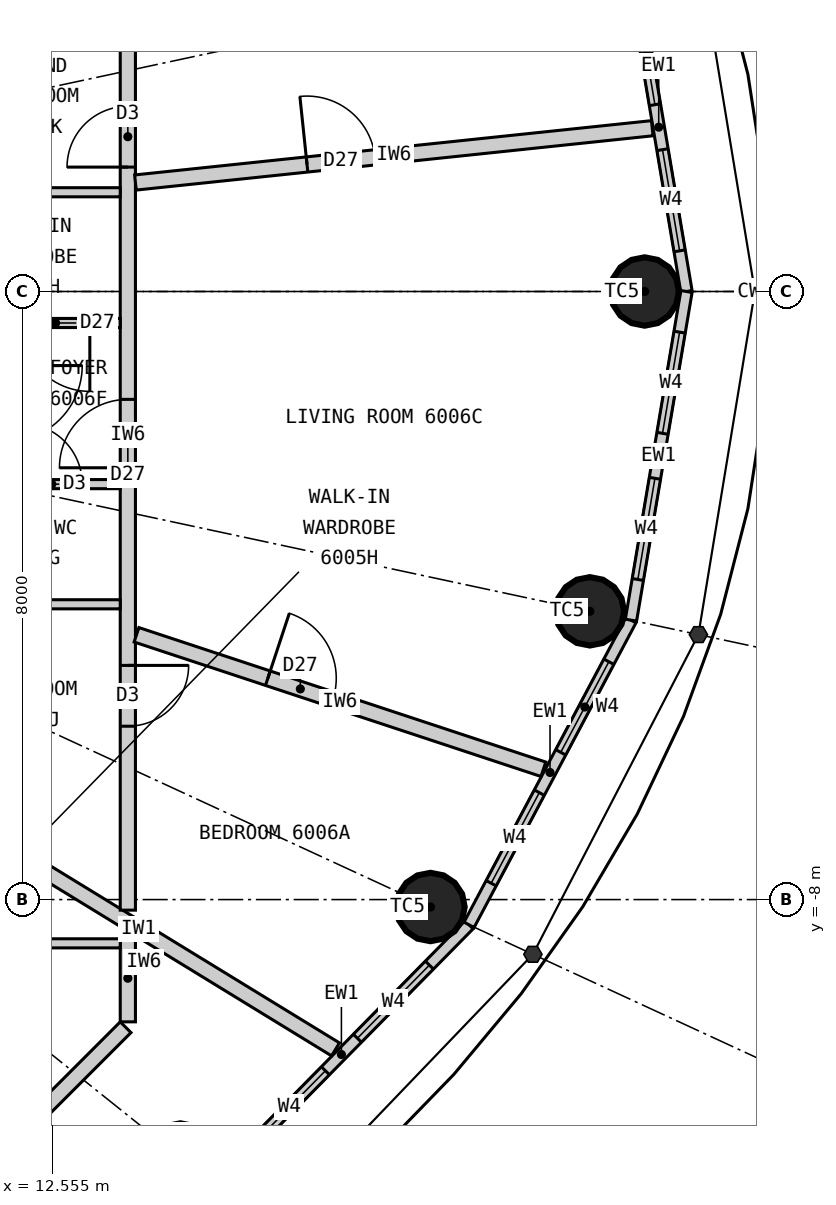
"""IFC4 building model, lengths in metres.
Left out: names, types, materials, properties, quantities, classifications, styles, units other than length and angle.
Written with IfcOpenShell. Run it as: python <this file> out.ifc"""

import sys

from ifc_helpers import new_model, si_unit, direction, frame, frame_2d, origin, origin_2d, place, context, subcontext, project, spatial, rectangle, circle, extrude, element, fill, save


model = new_model("IFC4")
c1 = context("Model", 3, precision=1e-05, world=origin(), true_north=direction((0.0, 1.0)))
c2 = subcontext(c1, "Body", "Model", "MODEL_VIEW")
j1 = project(units=[si_unit("LENGTHUNIT", "METRE"), si_unit("PLANEANGLEUNIT", "RADIAN")], contexts=[c1])
p1 = place(None, origin())
s1 = spatial("IfcSite", under=j1, at=p1, CompositionType="ELEMENT")
p2 = place(p1, origin())
s2 = spatial("IfcBuilding", under=s1, at=p2, CompositionType="ELEMENT")
p3 = place(p2, frame((0.0, 0.0, 222.6)))
s3 = spatial("IfcBuildingStorey", under=s2, at=p3, CompositionType="ELEMENT", Elevation=222.6)
for number, where, z_axis, x_axis in (
    (1, (20.35, 0.0, 0.0), (0.0, 0.0, 1.0), (1.0, 0.0, 0.0)),
    (2, (14.241, -11.393, 0.0), (0.0, 0.0, 1.0), (1.0, 0.0, 0.0)),
    (3, (17.532, -8.098, 0.0), (0.0, 0.0, 1.0), (1.0, 0.0, 0.0)),
    (4, (19.629, -4.208, 0.0), (0.0, 0.0, 1.0), (1.0, 0.0, 0.0)),
):
    element("IfcColumn", number, at=place(p3, frame(where, z_axis=z_axis, x_axis=x_axis)), inside=s3, PredefinedType="COLUMN", context=c2, shape_type="SweptSolid", body=[
        extrude(circle(Radius=0.45, at=origin_2d()), origin(), (0.0, 0.0, 1.0), 3.3),
    ])
p4 = place(p3, frame((20.9, 0.0, 0.0), z_axis=(0.0, 0.0, 1.0), x_axis=(-0.166538513568, 0.986034950445, 0.0)))
e5 = element("IfcWall", 5, at=p4, inside=s3, PredefinedType="ELEMENTEDWALL", context=c2, shape_type="SweptSolid", body=[
    extrude(rectangle(XDim=4.385, YDim=0.15, at=frame_2d((2.192, 0.0))), origin(), (0.0, 0.0, 1.0), 3.12),
])
p5 = place(p4, frame((0.542, 0.0, 0.9)))
e6 = element("IfcOpeningElement", 6, at=p5, cuts=e5, PredefinedType="OPENING", context=c2, shape_type="SweptSolid", body=[
    extrude(rectangle(XDim=1.35, YDim=1.9, at=frame_2d((0.675, 0.95))), frame((0.0, 0.085, 0.0), z_axis=(0.0, -1.0, 0.0), x_axis=(1.0, 0.0, 0.0)), (0.0, 0.0, 1.0), 0.17),
])
p6 = place(p4, frame((2.492, 0.0, 0.9)))
e7 = element("IfcOpeningElement", 7, at=p6, cuts=e5, PredefinedType="OPENING", context=c2, shape_type="SweptSolid", body=[
    extrude(rectangle(XDim=1.35, YDim=1.9, at=frame_2d((0.675, 0.95))), frame((0.0, 0.085, 0.0), z_axis=(0.0, -1.0, 0.0), x_axis=(1.0, 0.0, 0.0)), (0.0, 0.0, 1.0), 0.17),
])
p7 = place(p3, frame((14.68, -11.744, 0.0), z_axis=(0.0, 0.0, 1.0), x_axis=(0.701527379618, 0.712642501993, 0.0)))
e8 = element("IfcWall", 8, at=p7, inside=s3, PredefinedType="ELEMENTEDWALL", context=c2, shape_type="SweptSolid", body=[
    extrude(rectangle(XDim=4.788, YDim=0.15, at=frame_2d((2.394, 0.0))), origin(), (0.0, 0.0, 1.0), 3.12),
])
p8 = place(p7, frame((0.744, 0.0, 0.9)))
e9 = element("IfcOpeningElement", 9, at=p8, cuts=e8, PredefinedType="OPENING", context=c2, shape_type="SweptSolid", body=[
    extrude(rectangle(XDim=1.35, YDim=1.9, at=frame_2d((0.675, 0.95))), frame((0.0, 0.085, 0.0), z_axis=(0.0, -1.0, 0.0), x_axis=(1.0, 0.0, 0.0)), (0.0, 0.0, 1.0), 0.17),
])
p9 = place(p7, frame((2.694, 0.0, 0.9)))
e10 = element("IfcOpeningElement", 10, at=p9, cuts=e8, PredefinedType="OPENING", context=c2, shape_type="SweptSolid", body=[
    extrude(rectangle(XDim=1.35, YDim=1.9, at=frame_2d((0.675, 0.95))), frame((0.0, 0.085, 0.0), z_axis=(0.0, -1.0, 0.0), x_axis=(1.0, 0.0, 0.0)), (0.0, 0.0, 1.0), 0.17),
])
p10 = place(p3, frame((18.04, -8.332, 0.0), z_axis=(0.0, 0.0, 1.0), x_axis=(0.469256152955, 0.883062094597, 0.0)))
e11 = element("IfcWall", 11, at=p10, inside=s3, PredefinedType="ELEMENTEDWALL", context=c2, shape_type="SweptSolid", body=[
    extrude(rectangle(XDim=4.539, YDim=0.15, at=frame_2d((2.27, 0.0))), origin(), (0.0, 0.0, 1.0), 3.12),
])
p11 = place(p10, frame((0.62, 0.0, 0.9)))
e12 = element("IfcOpeningElement", 12, at=p11, cuts=e11, PredefinedType="OPENING", context=c2, shape_type="SweptSolid", body=[
    extrude(rectangle(XDim=1.35, YDim=1.9, at=frame_2d((0.675, 0.95))), frame((0.0, 0.085, 0.0), z_axis=(0.0, -1.0, 0.0), x_axis=(1.0, 0.0, 0.0)), (0.0, 0.0, 1.0), 0.17),
])
p12 = place(p10, frame((2.57, 0.0, 0.9)))
e13 = element("IfcOpeningElement", 13, at=p12, cuts=e11, PredefinedType="OPENING", context=c2, shape_type="SweptSolid", body=[
    extrude(rectangle(XDim=1.35, YDim=1.9, at=frame_2d((0.675, 0.95))), frame((0.0, 0.085, 0.0), z_axis=(0.0, -1.0, 0.0), x_axis=(1.0, 0.0, 0.0)), (0.0, 0.0, 1.0), 0.17),
])
p13 = place(p3, frame((20.17, -4.323, 0.0), z_axis=(0.0, 0.0, 1.0), x_axis=(0.166538513568, 0.986034950445, 0.0)))
e14 = element("IfcWall", 14, at=p13, inside=s3, PredefinedType="ELEMENTEDWALL", context=c2, shape_type="SweptSolid", body=[
    extrude(rectangle(XDim=4.385, YDim=0.15, at=frame_2d((2.192, 0.0))), origin(), (0.0, 0.0, 1.0), 3.12),
])
p14 = place(p13, frame((0.542, 0.0, 0.9)))
e15 = element("IfcOpeningElement", 15, at=p14, cuts=e14, PredefinedType="OPENING", context=c2, shape_type="SweptSolid", body=[
    extrude(rectangle(XDim=1.35, YDim=1.9, at=frame_2d((0.675, 0.95))), frame((0.0, 0.085, 0.0), z_axis=(0.0, -1.0, 0.0), x_axis=(1.0, 0.0, 0.0)), (0.0, 0.0, 1.0), 0.17),
])
p15 = place(p13, frame((2.492, 0.0, 0.9)))
e16 = element("IfcOpeningElement", 16, at=p15, cuts=e14, PredefinedType="OPENING", context=c2, shape_type="SweptSolid", body=[
    extrude(rectangle(XDim=1.35, YDim=1.9, at=frame_2d((0.675, 0.95))), frame((0.0, 0.085, 0.0), z_axis=(0.0, -1.0, 0.0), x_axis=(1.0, 0.0, 0.0)), (0.0, 0.0, 1.0), 0.17),
])
p16 = place(p3, frame((11.1, -6.797, 0.0), z_axis=(0.0, 0.0, 1.0), x_axis=(0.852799818179, -0.522237943963, 0.0)))
e17 = element("IfcWall", 17, at=p16, inside=s3, PredefinedType="PARTITIONING", context=c2, shape_type="SweptSolid", body=[
    extrude(rectangle(XDim=6.077, YDim=0.2, at=frame_2d((3.039, 0.0))), origin(), (0.0, 0.0, 1.0), 3.12),
])
p17 = place(p3, frame((10.679, -12.521, 0.0), z_axis=(0.0, 0.0, 1.0), x_axis=(0.707106781187, 0.707106781187, 0.0)))
e18 = element("IfcWall", 18, at=p17, inside=s3, PredefinedType="PARTITIONING", context=c2, shape_type="SweptSolid", body=[
    extrude(rectangle(XDim=4.019, YDim=0.2, at=frame_2d((2.009, 0.0))), origin(), (0.0, 0.0, 1.0), 3.12),
])
p18 = place(p3, frame((13.55, -9.609, 0.0), z_axis=(0.0, 0.0, 1.0), x_axis=(0.0, 1.0, 0.0)))
e19 = element("IfcWall", 19, at=p18, inside=s3, PredefinedType="PARTITIONING", context=c2, shape_type="SweptSolid", body=[
    extrude(rectangle(XDim=1.148, YDim=0.2, at=frame_2d((0.574, 0.0))), origin(), (0.0, 0.0, 1.0), 3.12),
])
p19 = place(p3, frame((11.1, -8.576, 0.0), z_axis=(0.0, 0.0, 1.0), x_axis=(1.0, 0.0, 0.0)))
e20 = element("IfcWall", 20, at=p19, inside=s3, PredefinedType="PARTITIONING", context=c2, shape_type="SweptSolid", body=[
    extrude(rectangle(XDim=2.35, YDim=0.12, at=frame_2d((1.175, 0.0))), origin(), (0.0, 0.0, 1.0), 3.12),
])
p20 = place(p19, frame((0.22, 0.0, 0.0)))
e21 = element("IfcOpeningElement", 21, at=p20, cuts=e20, PredefinedType="OPENING", context=c2, shape_type="SweptSolid", body=[
    extrude(rectangle(XDim=0.9, YDim=2.1, at=frame_2d((0.45, 1.05))), frame((0.0, 0.07, 0.0), z_axis=(0.0, -1.0, 0.0), x_axis=(1.0, 0.0, 0.0)), (0.0, 0.0, 1.0), 0.14),
])
p21 = place(p3, frame((13.55, -8.139, 0.0), z_axis=(0.0, 0.0, 1.0), x_axis=(0.0, 1.0, 0.0)))
e22 = element("IfcWall", 22, at=p21, inside=s3, PredefinedType="PARTITIONING", context=c2, shape_type="SweptSolid", body=[
    extrude(rectangle(XDim=12.496, YDim=0.2, at=frame_2d((6.248, 0.0))), origin(), (0.0, 0.0, 1.0), 3.12),
])
p22 = place(p21, frame((2.42, 0.0, 0.0)))
e23 = element("IfcOpeningElement", 23, at=p22, cuts=e22, PredefinedType="OPENING", context=c2, shape_type="SweptSolid", body=[
    extrude(rectangle(XDim=0.8, YDim=2.1, at=frame_2d((0.4, 1.05))), frame((0.0, 0.11, 0.0), z_axis=(0.0, -1.0, 0.0), x_axis=(1.0, 0.0, 0.0)), (0.0, 0.0, 1.0), 0.22),
])
p23 = place(p21, frame((9.776, 0.0, 0.0)))
e24 = element("IfcOpeningElement", 24, at=p23, cuts=e22, PredefinedType="OPENING", context=c2, shape_type="SweptSolid", body=[
    extrude(rectangle(XDim=0.8, YDim=2.1, at=frame_2d((0.4, 1.05))), frame((0.0, 0.11, 0.0), z_axis=(0.0, -1.0, 0.0), x_axis=(1.0, 0.0, 0.0)), (0.0, 0.0, 1.0), 0.22),
])
p24 = place(p21, frame((5.82, 0.0, 0.0)))
e25 = element("IfcOpeningElement", 25, at=p24, cuts=e22, PredefinedType="OPENING", context=c2, shape_type="SweptSolid", body=[
    extrude(rectangle(XDim=0.9, YDim=2.1, at=frame_2d((0.45, 1.05))), frame((0.0, 0.11, 0.0), z_axis=(0.0, -1.0, 0.0), x_axis=(1.0, 0.0, 0.0)), (0.0, 0.0, 1.0), 0.22),
])
p25 = place(p3, frame((13.664, -4.516, 0.0), z_axis=(0.0, 0.0, 1.0), x_axis=(0.949481375941, -0.313823384632, 0.0)))
e26 = element("IfcWall", 26, at=p25, inside=s3, PredefinedType="PARTITIONING", context=c2, shape_type="SweptSolid", body=[
    extrude(rectangle(XDim=5.638, YDim=0.2, at=frame_2d((2.819, 0.0))), origin(), (0.0, 0.0, 1.0), 3.12),
])
p26 = place(p25, frame((1.82, 0.0, 0.0)))
e27 = element("IfcOpeningElement", 27, at=p26, cuts=e26, PredefinedType="OPENING", context=c2, shape_type="SweptSolid", body=[
    extrude(rectangle(XDim=0.9, YDim=2.1, at=frame_2d((0.45, 1.05))), frame((0.0, 0.11, 0.0), z_axis=(0.0, -1.0, 0.0), x_axis=(1.0, 0.0, 0.0)), (0.0, 0.0, 1.0), 0.22),
])
p27 = place(p3, frame((13.65, 1.434, 0.0), z_axis=(0.0, 0.0, 1.0), x_axis=(0.994526954268, 0.10448031984, 0.0)))
e28 = element("IfcWall", 28, at=p27, inside=s3, PredefinedType="PARTITIONING", context=c2, shape_type="SweptSolid", body=[
    extrude(rectangle(XDim=6.837, YDim=0.2, at=frame_2d((3.418, 0.0))), origin(), (0.0, 0.0, 1.0), 2.47),
])
p28 = place(p27, frame((2.27, 0.0, 0.0)))
e29 = element("IfcOpeningElement", 29, at=p28, cuts=e28, PredefinedType="OPENING", context=c2, shape_type="SweptSolid", body=[
    extrude(rectangle(XDim=0.9, YDim=2.1, at=frame_2d((0.45, 1.05))), frame((0.0, 0.11, 0.0), z_axis=(0.0, -1.0, 0.0), x_axis=(1.0, 0.0, 0.0)), (0.0, 0.0, 1.0), 0.22),
])
p29 = place(p3, frame((11.1, -4.115, 0.0), z_axis=(0.0, 0.0, 1.0), x_axis=(1.0, 0.0, 0.0)))
e30 = element("IfcWall", 30, at=p29, inside=s3, PredefinedType="PARTITIONING", context=c2, shape_type="SweptSolid", body=[
    extrude(rectangle(XDim=2.35, YDim=0.12, at=frame_2d((1.175, 0.0))), origin(), (0.0, 0.0, 1.0), 3.12),
])
p30 = place(p3, frame((11.1, -2.534, 0.0), z_axis=(0.0, 0.0, 1.0), x_axis=(1.0, 0.0, 0.0)))
e31 = element("IfcWall", 31, at=p30, inside=s3, PredefinedType="PARTITIONING", context=c2, shape_type="SweptSolid", body=[
    extrude(rectangle(XDim=2.35, YDim=0.12, at=frame_2d((1.175, 0.0))), origin(), (0.0, 0.0, 1.0), 3.12),
])
p31 = place(p30, frame((1.05, 0.0, 0.0)))
e32 = element("IfcOpeningElement", 32, at=p31, cuts=e31, PredefinedType="OPENING", context=c2, shape_type="SweptSolid", body=[
    extrude(rectangle(XDim=0.8, YDim=2.1, at=frame_2d((0.4, 1.05))), frame((0.0, 0.07, 0.0), z_axis=(0.0, -1.0, 0.0), x_axis=(1.0, 0.0, 0.0)), (0.0, 0.0, 1.0), 0.14),
])
p32 = place(p3, frame((11.1, -0.414, 0.0), z_axis=(0.0, 0.0, 1.0), x_axis=(1.0, 0.0, 0.0)))
e33 = element("IfcWall", 33, at=p32, inside=s3, PredefinedType="PARTITIONING", context=c2, shape_type="SweptSolid", body=[
    extrude(rectangle(XDim=2.35, YDim=0.12, at=frame_2d((1.175, 0.0))), origin(), (0.0, 0.0, 1.0), 3.12),
])
p33 = place(p32, frame((1.05, 0.0, 0.0)))
e34 = element("IfcOpeningElement", 34, at=p33, cuts=e33, PredefinedType="OPENING", context=c2, shape_type="SweptSolid", body=[
    extrude(rectangle(XDim=0.9, YDim=2.1, at=frame_2d((0.45, 1.05))), frame((0.0, 0.07, 0.0), z_axis=(0.0, -1.0, 0.0), x_axis=(1.0, 0.0, 0.0)), (0.0, 0.0, 1.0), 0.14),
])
p34 = place(p3, frame((11.1, 1.306, 0.0), z_axis=(0.0, 0.0, 1.0), x_axis=(1.0, 0.0, 0.0)))
e35 = element("IfcWall", 35, at=p34, inside=s3, PredefinedType="PARTITIONING", context=c2, shape_type="SweptSolid", body=[
    extrude(rectangle(XDim=2.35, YDim=0.12, at=frame_2d((1.175, 0.0))), origin(), (0.0, 0.0, 1.0), 3.12),
])
p35 = place(p5, origin())
e36 = element("IfcWindow", 36, at=p35, inside=s3, PartitioningType="SINGLE_PANEL", PredefinedType="WINDOW", context=c2, shape_type="SweptSolid", body=[
    extrude(rectangle(XDim=1.35, YDim=1.9, at=frame_2d((0.675, 0.95))), frame((0.0, 0.03, 0.0), z_axis=(0.0, -1.0, 0.0), x_axis=(1.0, 0.0, 0.0)), (0.0, 0.0, 1.0), 0.06),
])
fill(e6, e36)
p36 = place(p6, origin())
e37 = element("IfcWindow", 37, at=p36, inside=s3, PartitioningType="SINGLE_PANEL", PredefinedType="WINDOW", context=c2, shape_type="SweptSolid", body=[
    extrude(rectangle(XDim=1.35, YDim=1.9, at=frame_2d((0.675, 0.95))), frame((0.0, 0.03, 0.0), z_axis=(0.0, -1.0, 0.0), x_axis=(1.0, 0.0, 0.0)), (0.0, 0.0, 1.0), 0.06),
])
fill(e7, e37)
p37 = place(p8, origin())
e38 = element("IfcWindow", 38, at=p37, inside=s3, PartitioningType="SINGLE_PANEL", PredefinedType="WINDOW", context=c2, shape_type="SweptSolid", body=[
    extrude(rectangle(XDim=1.35, YDim=1.9, at=frame_2d((0.675, 0.95))), frame((0.0, 0.03, 0.0), z_axis=(0.0, -1.0, 0.0), x_axis=(1.0, 0.0, 0.0)), (0.0, 0.0, 1.0), 0.06),
])
fill(e9, e38)
p38 = place(p9, origin())
e39 = element("IfcWindow", 39, at=p38, inside=s3, PartitioningType="SINGLE_PANEL", PredefinedType="WINDOW", context=c2, shape_type="SweptSolid", body=[
    extrude(rectangle(XDim=1.35, YDim=1.9, at=frame_2d((0.675, 0.95))), frame((0.0, 0.03, 0.0), z_axis=(0.0, -1.0, 0.0), x_axis=(1.0, 0.0, 0.0)), (0.0, 0.0, 1.0), 0.06),
])
fill(e10, e39)
p39 = place(p11, origin())
e40 = element("IfcWindow", 40, at=p39, inside=s3, PartitioningType="SINGLE_PANEL", PredefinedType="WINDOW", context=c2, shape_type="SweptSolid", body=[
    extrude(rectangle(XDim=1.35, YDim=1.9, at=frame_2d((0.675, 0.95))), frame((0.0, 0.03, 0.0), z_axis=(0.0, -1.0, 0.0), x_axis=(1.0, 0.0, 0.0)), (0.0, 0.0, 1.0), 0.06),
])
fill(e12, e40)
p40 = place(p12, origin())
e41 = element("IfcWindow", 41, at=p40, inside=s3, PartitioningType="SINGLE_PANEL", PredefinedType="WINDOW", context=c2, shape_type="SweptSolid", body=[
    extrude(rectangle(XDim=1.35, YDim=1.9, at=frame_2d((0.675, 0.95))), frame((0.0, 0.03, 0.0), z_axis=(0.0, -1.0, 0.0), x_axis=(1.0, 0.0, 0.0)), (0.0, 0.0, 1.0), 0.06),
])
fill(e13, e41)
p41 = place(p14, origin())
e42 = element("IfcWindow", 42, at=p41, inside=s3, PartitioningType="SINGLE_PANEL", PredefinedType="WINDOW", context=c2, shape_type="SweptSolid", body=[
    extrude(rectangle(XDim=1.35, YDim=1.9, at=frame_2d((0.675, 0.95))), frame((0.0, 0.03, 0.0), z_axis=(0.0, -1.0, 0.0), x_axis=(1.0, 0.0, 0.0)), (0.0, 0.0, 1.0), 0.06),
])
fill(e15, e42)
p42 = place(p15, origin())
e43 = element("IfcWindow", 43, at=p42, inside=s3, PartitioningType="SINGLE_PANEL", PredefinedType="WINDOW", context=c2, shape_type="SweptSolid", body=[
    extrude(rectangle(XDim=1.35, YDim=1.9, at=frame_2d((0.675, 0.95))), frame((0.0, 0.03, 0.0), z_axis=(0.0, -1.0, 0.0), x_axis=(1.0, 0.0, 0.0)), (0.0, 0.0, 1.0), 0.06),
])
fill(e16, e43)
p43 = place(p22, origin())
e44 = element("IfcDoor", 44, at=p43, inside=s3, OperationType="SINGLE_SWING_RIGHT", PredefinedType="DOOR", context=c2, shape_type="SweptSolid", body=[
    extrude(rectangle(XDim=0.8, YDim=2.1, at=frame_2d((0.4, 1.05))), frame((0.0, 0.025, 0.0), z_axis=(0.0, -1.0, 0.0), x_axis=(1.0, 0.0, 0.0)), (0.0, 0.0, 1.0), 0.05),
])
fill(e23, e44)
p44 = place(p31, origin())
e45 = element("IfcDoor", 45, at=p44, inside=s3, OperationType="SINGLE_SWING_LEFT", PredefinedType="DOOR", context=c2, shape_type="SweptSolid", body=[
    extrude(rectangle(XDim=0.8, YDim=2.1, at=frame_2d((0.4, 1.05))), frame((0.0, 0.025, 0.0), z_axis=(0.0, -1.0, 0.0), x_axis=(1.0, 0.0, 0.0)), (0.0, 0.0, 1.0), 0.05),
])
fill(e32, e45)
p45 = place(p33, origin())
e46 = element("IfcDoor", 46, at=p45, inside=s3, OperationType="SINGLE_SWING_RIGHT", PredefinedType="DOOR", context=c2, shape_type="SweptSolid", body=[
    extrude(rectangle(XDim=0.9, YDim=2.1, at=frame_2d((0.45, 1.05))), frame((0.0, 0.025, 0.0), z_axis=(0.0, -1.0, 0.0), x_axis=(1.0, 0.0, 0.0)), (0.0, 0.0, 1.0), 0.05),
])
fill(e34, e46)
p46 = place(p23, origin())
e47 = element("IfcDoor", 47, at=p46, inside=s3, OperationType="SINGLE_SWING_LEFT", PredefinedType="DOOR", context=c2, shape_type="SweptSolid", body=[
    extrude(rectangle(XDim=0.8, YDim=2.1, at=frame_2d((0.4, 1.05))), frame((0.0, 0.025, 0.0), z_axis=(0.0, -1.0, 0.0), x_axis=(1.0, 0.0, 0.0)), (0.0, 0.0, 1.0), 0.05),
])
fill(e24, e47)
p47 = place(p24, origin())
e48 = element("IfcDoor", 48, at=p47, inside=s3, OperationType="SINGLE_SWING_LEFT", PredefinedType="DOOR", context=c2, shape_type="SweptSolid", body=[
    extrude(rectangle(XDim=0.9, YDim=2.1, at=frame_2d((0.45, 1.05))), frame((0.0, 0.025, 0.0), z_axis=(0.0, -1.0, 0.0), x_axis=(1.0, 0.0, 0.0)), (0.0, 0.0, 1.0), 0.05),
])
fill(e25, e48)
p48 = place(p26, origin())
e49 = element("IfcDoor", 49, at=p48, inside=s3, OperationType="SINGLE_SWING_LEFT", PredefinedType="DOOR", context=c2, shape_type="SweptSolid", body=[
    extrude(rectangle(XDim=0.9, YDim=2.1, at=frame_2d((0.45, 1.05))), frame((0.0, 0.025, 0.0), z_axis=(0.0, -1.0, 0.0), x_axis=(1.0, 0.0, 0.0)), (0.0, 0.0, 1.0), 0.05),
])
fill(e27, e49)
p49 = place(p28, origin())
e50 = element("IfcDoor", 50, at=p49, inside=s3, OperationType="SINGLE_SWING_LEFT", PredefinedType="DOOR", context=c2, shape_type="SweptSolid", body=[
    extrude(rectangle(XDim=0.9, YDim=2.1, at=frame_2d((0.45, 1.05))), frame((0.0, 0.025, 0.0), z_axis=(0.0, -1.0, 0.0), x_axis=(1.0, 0.0, 0.0)), (0.0, 0.0, 1.0), 0.05),
])
fill(e29, e50)
save(model, sys.argv[1])
